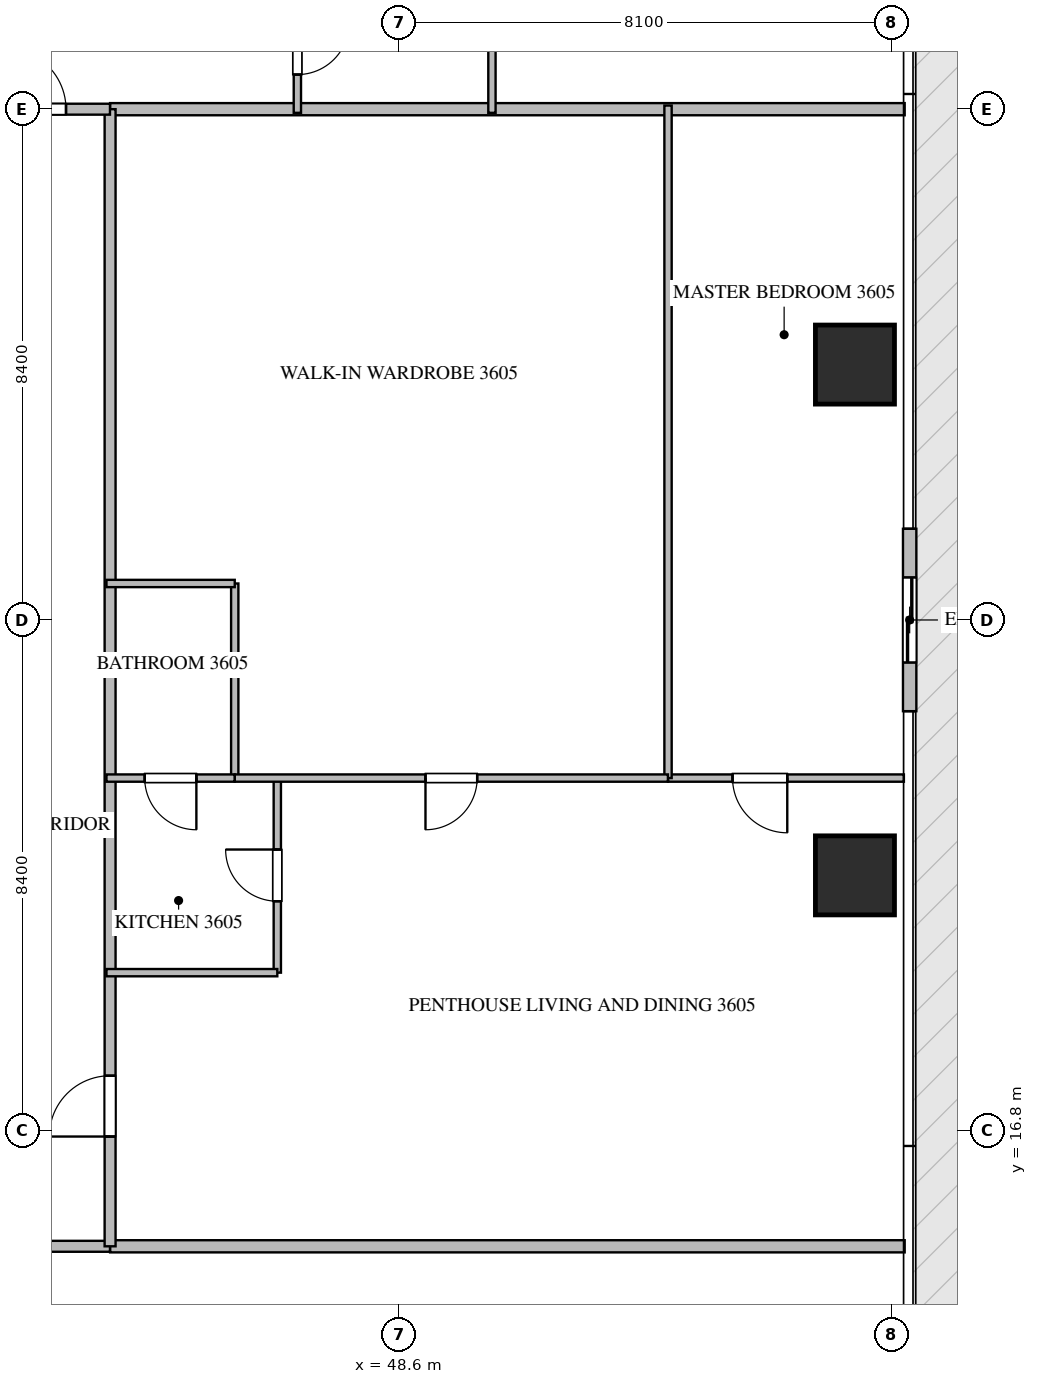
"""IFC4 building model, lengths in metres.
Left out: names, types, materials, properties, quantities, classifications, styles, units other than length and angle.
Written with IfcOpenShell. Run it as: python <this file> out.ifc"""

import sys

from ifc_helpers import new_model, si_unit, direction, frame, frame_2d, origin, origin_2d, place, context, subcontext, project, spatial, rectangle, extrude, source, transform, mapped, element, fill, save


model = new_model("IFC4")
c1 = context("Model", 3, precision=1e-05, world=origin(), true_north=direction((0.0, 1.0)))
c2 = subcontext(c1, "Body", "Model", "MODEL_VIEW")
j1 = project(units=[si_unit("LENGTHUNIT", "METRE"), si_unit("PLANEANGLEUNIT", "RADIAN")], contexts=[c1])
p1 = place(None, origin())
s1 = spatial("IfcSite", under=j1, at=p1, CompositionType="ELEMENT")
p2 = place(p1, origin())
s2 = spatial("IfcBuilding", under=s1, at=p2, CompositionType="ELEMENT")
p3 = place(p2, frame((0.0, 0.0, 146.4)))
s3 = spatial("IfcBuildingStorey", under=s2, at=p3, CompositionType="ELEMENT", Elevation=146.4)
m1 = source(origin(), c2, "Body", "SweptSolid", [
    extrude(rectangle(XDim=1.3, YDim=1.3, at=origin_2d()), origin(), (0.0, 0.0, 1.0), 3.75),
])
for number, where, z_axis, x_axis in (
    (1, (56.1, 21.0, -0.26), (0.0, 0.0, 1.0), (1.0, 0.0, 0.0)),
    (2, (56.1, 29.4, -0.26), (0.0, 0.0, 1.0), (1.0, 0.0, 0.0)),
):
    element("IfcColumn", number, at=place(p3, frame(where, z_axis=z_axis, x_axis=x_axis)), inside=s3, PredefinedType="COLUMN", context=c2, shape_type="MappedRepresentation", body=[
        mapped(m1, transform((0.0, 0.0, 0.0), scale=1.0)),
    ])
p4 = place(p3, frame((57.0, 23.7, 0.0), z_axis=(0.0, 0.0, 1.0), x_axis=(0.0, 1.0, 0.0)))
e3 = element("IfcWall", 3, at=p4, inside=s3, PredefinedType="ELEMENTEDWALL", context=c2, shape_type="SweptSolid", body=[
    extrude(rectangle(XDim=3.0, YDim=0.22, at=frame_2d((1.5, 0.0))), origin(), (0.0, 0.0, 1.0), 3.475),
])
p5 = place(p4, frame((0.8, 0.0, 0.0)))
e4 = element("IfcOpeningElement", 4, at=p5, cuts=e3, PredefinedType="OPENING", context=c2, shape_type="SweptSolid", body=[
    extrude(rectangle(XDim=1.4, YDim=2.25, at=frame_2d((0.7, 1.125))), frame((0.0, 0.12, 0.0), z_axis=(0.0, -1.0, 0.0), x_axis=(1.0, 0.0, 0.0)), (0.0, 0.0, 1.0), 0.24),
])
for number, where, z_axis, x_axis in (
    (5, (43.85, 14.9, 0.0), (0.0, 0.0, 1.0), (1.0, 0.0, 0.0)),
    (6, (43.85, 33.6, 0.0), (0.0, 0.0, 1.0), (1.0, 0.0, 0.0)),
):
    element("IfcWall", number, at=place(p3, frame(where, z_axis=z_axis, x_axis=x_axis)), inside=s3, PredefinedType="PARTITIONING", context=c2, shape_type="SweptSolid", body=[
        extrude(rectangle(XDim=13.068, YDim=0.2, at=frame_2d((6.534, 0.0))), origin(), (0.0, 0.0, 1.0), 3.49),
    ])
p6 = place(p3, frame((20.952, 14.9, 0.0), z_axis=(0.0, 0.0, 1.0), x_axis=(1.0, 0.0, 0.0)))
e7 = element("IfcWall", 7, at=p6, inside=s3, PredefinedType="PARTITIONING", context=c2, shape_type="SweptSolid", body=[
    extrude(rectangle(XDim=22.896, YDim=0.18, at=frame_2d((11.448, 0.0))), origin(), (0.0, 0.0, 1.0), 3.49),
])
p7 = place(p6, frame((7.51, 0.0, 0.0)))
e8 = element("IfcOpeningElement", 8, at=p7, cuts=e7, PredefinedType="OPENING", context=c2, shape_type="SweptSolid", body=[
    extrude(rectangle(XDim=1.0, YDim=2.15, at=frame_2d((0.5, 1.075))), frame((0.0, 0.1, 0.0), z_axis=(0.0, -1.0, 0.0), x_axis=(1.0, 0.0, 0.0)), (0.0, 0.0, 1.0), 0.2),
])
p8 = place(p3, frame((43.85, 14.9, 0.0), z_axis=(0.0, 0.0, 1.0), x_axis=(0.0, 1.0, 0.0)))
e9 = element("IfcWall", 9, at=p8, inside=s3, PredefinedType="PARTITIONING", context=c2, shape_type="SweptSolid", body=[
    extrude(rectangle(XDim=18.7, YDim=0.18, at=frame_2d((9.35, 0.0))), origin(), (0.0, 0.0, 1.0), 3.49),
])
p9 = place(p8, frame((1.805, 0.0, 0.0)))
e10 = element("IfcOpeningElement", 10, at=p9, cuts=e9, PredefinedType="OPENING", context=c2, shape_type="SweptSolid", body=[
    extrude(rectangle(XDim=1.0, YDim=2.15, at=frame_2d((0.5, 1.075))), frame((0.0, 0.1, 0.0), z_axis=(0.0, -1.0, 0.0), x_axis=(1.0, 0.0, 0.0)), (0.0, 0.0, 1.0), 0.2),
])
p10 = place(p3, frame((41.402, 33.6, 0.0), z_axis=(0.0, 0.0, 1.0), x_axis=(1.0, 0.0, 0.0)))
e11 = element("IfcWall", 11, at=p10, inside=s3, PredefinedType="PARTITIONING", context=c2, shape_type="SweptSolid", body=[
    extrude(rectangle(XDim=2.446, YDim=0.18, at=frame_2d((1.223, 0.0))), origin(), (0.0, 0.0, 1.0), 3.49),
])
p11 = place(p10, frame((0.723, 0.0, 0.0)))
e12 = element("IfcOpeningElement", 12, at=p11, cuts=e11, PredefinedType="OPENING", context=c2, shape_type="SweptSolid", body=[
    extrude(rectangle(XDim=1.0, YDim=2.15, at=frame_2d((0.5, 1.075))), frame((0.0, 0.1, 0.0), z_axis=(0.0, -1.0, 0.0), x_axis=(1.0, 0.0, 0.0)), (0.0, 0.0, 1.0), 0.2),
])
p12 = place(p3, frame((50.13, 35.65, 0.0), z_axis=(0.0, 0.0, 1.0), x_axis=(0.0, -1.0, 0.0)))
e13 = element("IfcWall", 13, at=p12, inside=s3, PredefinedType="PARTITIONING", context=c2, shape_type="SweptSolid", body=[
    extrude(rectangle(XDim=2.11, YDim=0.12, at=frame_2d((1.055, 0.0))), origin(), (0.0, 0.0, 1.0), 3.49),
])
p13 = place(p3, frame((46.93, 35.648, 0.0), z_axis=(0.0, 0.0, 1.0), x_axis=(0.0, -1.0, 0.0)))
e14 = element("IfcWall", 14, at=p13, inside=s3, PredefinedType="PARTITIONING", context=c2, shape_type="SweptSolid", body=[
    extrude(rectangle(XDim=2.108, YDim=0.12, at=frame_2d((1.054, 0.0))), origin(), (0.0, 0.0, 1.0), 3.49),
])
p14 = place(p13, frame((0.629, 0.0, 0.0)))
e15 = element("IfcOpeningElement", 15, at=p14, cuts=e14, PredefinedType="OPENING", context=c2, shape_type="SweptSolid", body=[
    extrude(rectangle(XDim=0.85, YDim=2.1, at=frame_2d((0.425, 1.05))), frame((0.0, 0.07, 0.0), z_axis=(0.0, -1.0, 0.0), x_axis=(1.0, 0.0, 0.0)), (0.0, 0.0, 1.0), 0.14),
])
p15 = place(p3, frame((46.6, 19.4, 0.0), z_axis=(0.0, 0.0, 1.0), x_axis=(0.0, 1.0, 0.0)))
e16 = element("IfcWall", 16, at=p15, inside=s3, PredefinedType="PARTITIONING", context=c2, shape_type="SweptSolid", body=[
    extrude(rectangle(XDim=3.2, YDim=0.12, at=frame_2d((1.6, 0.0))), origin(), (0.0, 0.0, 1.0), 3.49),
])
p16 = place(p15, frame((1.175, 0.0, 0.0)))
e17 = element("IfcOpeningElement", 17, at=p16, cuts=e16, PredefinedType="OPENING", context=c2, shape_type="SweptSolid", body=[
    extrude(rectangle(XDim=0.85, YDim=2.1, at=frame_2d((0.425, 1.05))), frame((0.0, 0.07, 0.0), z_axis=(0.0, -1.0, 0.0), x_axis=(1.0, 0.0, 0.0)), (0.0, 0.0, 1.0), 0.14),
])
p17 = place(p3, frame((46.6, 19.4, 0.0), z_axis=(0.0, 0.0, 1.0), x_axis=(-1.0, 0.0, 0.0)))
e18 = element("IfcWall", 18, at=p17, inside=s3, PredefinedType="PARTITIONING", context=c2, shape_type="SweptSolid", body=[
    extrude(rectangle(XDim=2.81, YDim=0.12, at=frame_2d((1.405, 0.0))), origin(), (0.0, 0.0, 1.0), 3.49),
])
p18 = place(p3, frame((56.905, 22.6, 0.0), z_axis=(0.0, 0.0, 1.0), x_axis=(-1.0, 0.0, 0.0)))
e19 = element("IfcWall", 19, at=p18, inside=s3, PredefinedType="PARTITIONING", context=c2, shape_type="SweptSolid", body=[
    extrude(rectangle(XDim=3.879, YDim=0.12, at=frame_2d((1.939, 0.0))), origin(), (0.0, 0.0, 1.0), 3.49),
])
p19 = place(p18, frame((1.918, 0.0, 0.0)))
e20 = element("IfcOpeningElement", 20, at=p19, cuts=e19, PredefinedType="OPENING", context=c2, shape_type="SweptSolid", body=[
    extrude(rectangle(XDim=0.9, YDim=2.1, at=frame_2d((0.45, 1.05))), frame((0.0, 0.07, 0.0), z_axis=(0.0, -1.0, 0.0), x_axis=(1.0, 0.0, 0.0)), (0.0, 0.0, 1.0), 0.14),
])
p20 = place(p3, frame((53.026, 22.6, 0.0), z_axis=(0.0, 0.0, 1.0), x_axis=(0.0, 1.0, 0.0)))
e21 = element("IfcWall", 21, at=p20, inside=s3, PredefinedType="PARTITIONING", context=c2, shape_type="SweptSolid", body=[
    extrude(rectangle(XDim=11.06, YDim=0.12, at=frame_2d((5.53, 0.0))), origin(), (0.0, 0.0, 1.0), 3.49),
])
p21 = place(p3, frame((45.9, 22.6, 0.0), z_axis=(0.0, 0.0, 1.0), x_axis=(0.0, 1.0, 0.0)))
e22 = element("IfcWall", 22, at=p21, inside=s3, PredefinedType="PARTITIONING", context=c2, shape_type="SweptSolid", body=[
    extrude(rectangle(XDim=3.2, YDim=0.12, at=frame_2d((1.6, 0.0))), origin(), (0.0, 0.0, 1.0), 3.49),
])
p22 = place(p3, frame((45.9, 25.8, 0.0), z_axis=(0.0, 0.0, 1.0), x_axis=(-1.0, 0.0, 0.0)))
e23 = element("IfcWall", 23, at=p22, inside=s3, PredefinedType="PARTITIONING", context=c2, shape_type="SweptSolid", body=[
    extrude(rectangle(XDim=2.11, YDim=0.12, at=frame_2d((1.055, 0.0))), origin(), (0.0, 0.0, 1.0), 3.49),
])
p23 = place(p3, frame((53.024, 22.6, 0.0), z_axis=(0.0, 0.0, 1.0), x_axis=(-1.0, 0.0, 0.0)))
e24 = element("IfcWall", 24, at=p23, inside=s3, PredefinedType="PARTITIONING", context=c2, shape_type="SweptSolid", body=[
    extrude(rectangle(XDim=7.124, YDim=0.12, at=frame_2d((3.562, 0.0))), origin(), (0.0, 0.0, 1.0), 3.49),
])
p24 = place(p23, frame((3.137, 0.0, 0.0)))
e25 = element("IfcOpeningElement", 25, at=p24, cuts=e24, PredefinedType="OPENING", context=c2, shape_type="SweptSolid", body=[
    extrude(rectangle(XDim=0.85, YDim=2.1, at=frame_2d((0.425, 1.05))), frame((0.0, 0.07, 0.0), z_axis=(0.0, -1.0, 0.0), x_axis=(1.0, 0.0, 0.0)), (0.0, 0.0, 1.0), 0.14),
])
p25 = place(p3, frame((45.898, 22.6, 0.0), z_axis=(0.0, 0.0, 1.0), x_axis=(-1.0, 0.0, 0.0)))
e26 = element("IfcWall", 26, at=p25, inside=s3, PredefinedType="PARTITIONING", context=c2, shape_type="SweptSolid", body=[
    extrude(rectangle(XDim=2.108, YDim=0.12, at=frame_2d((1.054, 0.0))), origin(), (0.0, 0.0, 1.0), 3.49),
])
p26 = place(p25, frame((0.629, 0.0, 0.0)))
e27 = element("IfcOpeningElement", 27, at=p26, cuts=e26, PredefinedType="OPENING", context=c2, shape_type="SweptSolid", body=[
    extrude(rectangle(XDim=0.85, YDim=2.1, at=frame_2d((0.425, 1.05))), frame((0.0, 0.07, 0.0), z_axis=(0.0, -1.0, 0.0), x_axis=(1.0, 0.0, 0.0)), (0.0, 0.0, 1.0), 0.14),
])
m2 = source(origin(), c2, "Body", "SweptSolid", [
    extrude(rectangle(XDim=1.4, YDim=2.25, at=frame_2d((0.7, 1.125))), frame((0.0, 0.025, 0.0), z_axis=(0.0, -1.0, 0.0), x_axis=(1.0, 0.0, 0.0)), (0.0, 0.0, 1.0), 0.05),
])
p27 = place(p5, origin())
e28 = element("IfcDoor", 28, at=p27, inside=s3, OperationType="SLIDING_TO_LEFT", PredefinedType="DOOR", context=c2, shape_type="MappedRepresentation", body=[
    mapped(m2, transform((0.0, 0.0, 0.0), scale=1.0)),
])
fill(e4, e28)
m3 = source(origin(), c2, "Body", "SweptSolid", [
    extrude(rectangle(XDim=1.0, YDim=2.15, at=frame_2d((0.5, 1.075))), frame((0.0, 0.025, 0.0), z_axis=(0.0, -1.0, 0.0), x_axis=(1.0, 0.0, 0.0)), (0.0, 0.0, 1.0), 0.05),
])
p28 = place(p9, origin())
e29 = element("IfcDoor", 29, at=p28, inside=s3, OperationType="SINGLE_SWING_LEFT", PredefinedType="DOOR", context=c2, shape_type="MappedRepresentation", body=[
    mapped(m3, transform((0.0, 0.0, 0.0), scale=1.0)),
])
fill(e10, e29)
p29 = place(p11, origin())
e30 = element("IfcDoor", 30, at=p29, inside=s3, OperationType="SINGLE_SWING_LEFT", PredefinedType="DOOR", context=c2, shape_type="MappedRepresentation", body=[
    mapped(m3, transform((0.0, 0.0, 0.0), scale=1.0)),
])
fill(e12, e30)
m4 = source(origin(), c2, "Body", "SweptSolid", [
    extrude(rectangle(XDim=0.85, YDim=2.1, at=frame_2d((0.425, 1.05))), frame((0.0, 0.025, 0.0), z_axis=(0.0, -1.0, 0.0), x_axis=(1.0, 0.0, 0.0)), (0.0, 0.0, 1.0), 0.05),
])
p30 = place(p14, origin())
e31 = element("IfcDoor", 31, at=p30, inside=s3, OperationType="SINGLE_SWING_LEFT", PredefinedType="DOOR", context=c2, shape_type="MappedRepresentation", body=[
    mapped(m4, transform((0.0, 0.0, 0.0), scale=1.0)),
])
fill(e15, e31)
p31 = place(p16, origin())
e32 = element("IfcDoor", 32, at=p31, inside=s3, OperationType="SINGLE_SWING_RIGHT", PredefinedType="DOOR", context=c2, shape_type="MappedRepresentation", body=[
    mapped(m4, transform((0.0, 0.0, 0.0), scale=1.0)),
])
fill(e17, e32)
m5 = source(origin(), c2, "Body", "SweptSolid", [
    extrude(rectangle(XDim=0.9, YDim=2.1, at=frame_2d((0.45, 1.05))), frame((0.0, 0.025, 0.0), z_axis=(0.0, -1.0, 0.0), x_axis=(1.0, 0.0, 0.0)), (0.0, 0.0, 1.0), 0.05),
])
p32 = place(p19, origin())
e33 = element("IfcDoor", 33, at=p32, inside=s3, OperationType="SINGLE_SWING_LEFT", PredefinedType="DOOR", context=c2, shape_type="MappedRepresentation", body=[
    mapped(m5, transform((0.0, 0.0, 0.0), scale=1.0)),
])
fill(e20, e33)
p33 = place(p24, origin())
e34 = element("IfcDoor", 34, at=p33, inside=s3, OperationType="SINGLE_SWING_RIGHT", PredefinedType="DOOR", context=c2, shape_type="MappedRepresentation", body=[
    mapped(m4, transform((0.0, 0.0, 0.0), scale=1.0)),
])
fill(e25, e34)
p34 = place(p26, origin())
e35 = element("IfcDoor", 35, at=p34, inside=s3, OperationType="SINGLE_SWING_LEFT", PredefinedType="DOOR", context=c2, shape_type="MappedRepresentation", body=[
    mapped(m4, transform((0.0, 0.0, 0.0), scale=1.0)),
])
fill(e27, e35)
save(model, sys.argv[1])
